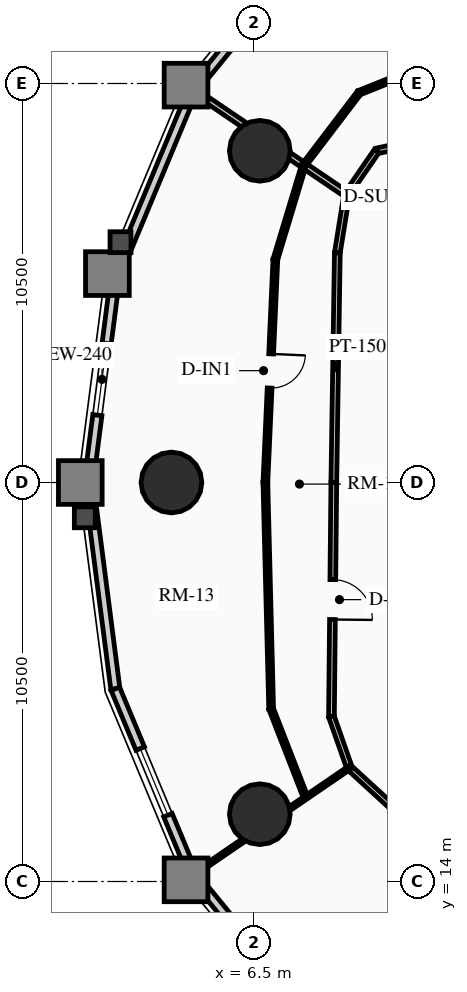
"""IFC4 building model, lengths in metres.
Left out: names, types, materials, properties, quantities, classifications, styles, units other than length and angle.
Written with IfcOpenShell. Run it as: python <this file> out.ifc"""

import sys

from ifc_helpers import new_model, si_unit, direction, frame, frame_2d, origin, origin_2d, place, context, subcontext, project, spatial, rectangle, circle, extrude, source, transform, mapped, element, fill, save


model = new_model("IFC4")
c1 = context("Model", 3, precision=1e-05, world=origin(), true_north=direction((0.0, 1.0)))
c2 = subcontext(c1, "Body", "Model", "MODEL_VIEW")
j1 = project(units=[si_unit("LENGTHUNIT", "METRE"), si_unit("PLANEANGLEUNIT", "RADIAN")], contexts=[c1])
p1 = place(None, origin())
s1 = spatial("IfcSite", under=j1, at=p1, CompositionType="ELEMENT")
p2 = place(p1, origin())
s2 = spatial("IfcBuilding", under=s1, at=p2, CompositionType="ELEMENT")
p3 = place(p2, frame((0.0, 0.0, 22.0)))
s3 = spatial("IfcBuildingStorey", under=s2, at=p3, CompositionType="ELEMENT", Elevation=22.0)
for number, where, z_axis, x_axis in (
    (1, (6.653, 33.229, 0.0), (0.0, 0.0, 1.0), (1.0, 0.0, 0.0)),
    (2, (4.328, 24.5, 0.0), (0.0, 0.0, 1.0), (1.0, 0.0, 0.0)),
    (3, (6.653, 15.771, 0.0), (0.0, 0.0, 1.0), (1.0, 0.0, 0.0)),
):
    element("IfcColumn", number, at=place(p3, frame(where, z_axis=z_axis, x_axis=x_axis)), inside=s3, PredefinedType="USERDEFINED", context=c2, shape_type="SweptSolid", body=[
        extrude(circle(Radius=0.8, at=origin_2d()), origin(), (0.0, 0.0, 1.0), 2.91),
    ])
p4 = place(p3, frame((4.89, 34.827, 0.0), z_axis=(0.0, 0.0, 1.0), x_axis=(0.632588557044, 0.774488035735, 0.0)))
e4 = element("IfcWall", 4, at=p4, inside=s3, PredefinedType="SOLIDWALL", context=c2, shape_type="SweptSolid", body=[
    extrude(rectangle(XDim=5.019, YDim=0.24, at=frame_2d((2.509, 0.0))), origin(), (0.0, 0.0, 1.0), 2.073),
])
m1 = source(origin(), c2, "Body", "SweptSolid", [
    extrude(rectangle(XDim=2.2, YDim=1.35, at=frame_2d((1.1, 0.675))), frame((0.0, 0.13, 0.0), z_axis=(0.0, -1.0, 0.0), x_axis=(1.0, 0.0, 0.0)), (0.0, 0.0, 1.0), 0.26),
])
p5 = place(p4, frame((1.409, 0.0, 0.65)))
e5 = element("IfcOpeningElement", 5, at=p5, cuts=e4, PredefinedType="OPENING", context=c2, shape_type="MappedRepresentation", body=[
    mapped(m1, transform((0.0, 0.0, 0.0), x_axis=(1.0, 0.0, 0.0), y_axis=(0.0, 1.0, 0.0), z_axis=(0.0, 0.0, 1.0), scale=1.0)),
])
p6 = place(p3, frame((2.851, 29.929, 0.0), z_axis=(0.0, 0.0, 1.0), x_axis=(0.384255919668, 0.923226618009, 0.0)))
e6 = element("IfcWall", 6, at=p6, inside=s3, PredefinedType="SOLIDWALL", context=c2, shape_type="SweptSolid", body=[
    extrude(rectangle(XDim=5.305, YDim=0.24, at=frame_2d((2.653, 0.0))), origin(), (0.0, 0.0, 1.0), 2.073),
])
p7 = place(p3, frame((2.149, 24.5, 0.0), z_axis=(0.0, 0.0, 1.0), x_axis=(0.128298189174, 0.991735637483, 0.0)))
e7 = element("IfcWall", 7, at=p7, inside=s3, PredefinedType="SOLIDWALL", context=c2, shape_type="SweptSolid", body=[
    extrude(rectangle(XDim=5.475, YDim=0.24, at=frame_2d((2.737, 0.0))), origin(), (0.0, 0.0, 1.0), 2.073),
])
m2 = source(origin(), c2, "Body", "SweptSolid", [
    extrude(rectangle(XDim=1.9, YDim=1.35, at=frame_2d((0.95, 0.675))), frame((0.0, 0.13, 0.0), z_axis=(0.0, -1.0, 0.0), x_axis=(1.0, 0.0, 0.0)), (0.0, 0.0, 1.0), 0.26),
])
p8 = place(p7, frame((1.787, 0.0, 0.65)))
e8 = element("IfcOpeningElement", 8, at=p8, cuts=e7, PredefinedType="OPENING", context=c2, shape_type="MappedRepresentation", body=[
    mapped(m2, transform((0.0, 0.0, 0.0), x_axis=(1.0, 0.0, 0.0), y_axis=(0.0, 1.0, 0.0), z_axis=(0.0, 0.0, 1.0), scale=1.0)),
])
p9 = place(p3, frame((2.851, 19.071, 0.0), z_axis=(0.0, 0.0, 1.0), x_axis=(-0.128298189174, 0.991735637483, 0.0)))
e9 = element("IfcWall", 9, at=p9, inside=s3, PredefinedType="SOLIDWALL", context=c2, shape_type="SweptSolid", body=[
    extrude(rectangle(XDim=5.475, YDim=0.24, at=frame_2d((2.737, 0.0))), origin(), (0.0, 0.0, 1.0), 2.073),
])
p10 = place(p3, frame((4.89, 14.173, 0.0), z_axis=(0.0, 0.0, 1.0), x_axis=(-0.384255919668, 0.923226618009, 0.0)))
e10 = element("IfcWall", 10, at=p10, inside=s3, PredefinedType="SOLIDWALL", context=c2, shape_type="SweptSolid", body=[
    extrude(rectangle(XDim=5.305, YDim=0.24, at=frame_2d((2.653, 0.0))), origin(), (0.0, 0.0, 1.0), 2.073),
])
p11 = place(p10, frame((1.703, 0.0, 0.65)))
e11 = element("IfcOpeningElement", 11, at=p11, cuts=e10, PredefinedType="OPENING", context=c2, shape_type="MappedRepresentation", body=[
    mapped(m2, transform((0.0, 0.0, 0.0), x_axis=(1.0, 0.0, 0.0), y_axis=(0.0, 1.0, 0.0), z_axis=(0.0, 0.0, 1.0), scale=1.0)),
])
p12 = place(p3, frame((8.065, 10.286, 0.0), z_axis=(0.0, 0.0, 1.0), x_axis=(-0.632588557044, 0.774488035735, 0.0)))
e12 = element("IfcWall", 12, at=p12, inside=s3, PredefinedType="SOLIDWALL", context=c2, shape_type="SweptSolid", body=[
    extrude(rectangle(XDim=5.019, YDim=0.24, at=frame_2d((2.509, 0.0))), origin(), (0.0, 0.0, 1.0), 2.073),
])
p13 = place(p3, frame((11.62, 33.637, 0.0), z_axis=(0.0, 0.0, 1.0), x_axis=(-0.97702579435, -0.213121085711, 0.0)))
e13 = element("IfcWall", 13, at=p13, inside=s3, PredefinedType="PARTITIONING", context=c2, shape_type="SweptSolid", body=[
    extrude(rectangle(XDim=1.935, YDim=0.15, at=frame_2d((0.967, 0.0))), origin(), (0.0, 0.0, 1.0), 2.159),
])
m3 = source(origin(), c2, "Body", "SweptSolid", [
    extrude(rectangle(XDim=1.05, YDim=2.015, at=frame_2d((0.525, 1.007))), frame((0.0, 0.085, 0.0), z_axis=(0.0, -1.0, 0.0), x_axis=(1.0, 0.0, 0.0)), (0.0, 0.0, 1.0), 0.17),
])
p14 = place(p13, frame((0.442, 0.0, 0.0)))
e14 = element("IfcOpeningElement", 14, at=p14, cuts=e13, PredefinedType="OPENING", context=c2, shape_type="MappedRepresentation", body=[
    mapped(m3, transform((0.0, 0.0, 0.0), x_axis=(1.0, 0.0, 0.0), y_axis=(0.0, 1.0, 0.0), z_axis=(0.0, 0.0, 1.0), scale=1.0)),
])
p15 = place(p3, frame((9.729, 33.225, 0.0), z_axis=(0.0, 0.0, 1.0), x_axis=(-0.567183649484, -0.82359134755, 0.0)))
e15 = element("IfcWall", 15, at=p15, inside=s3, PredefinedType="PARTITIONING", context=c2, shape_type="SweptSolid", body=[
    extrude(rectangle(XDim=1.392, YDim=0.15, at=frame_2d((0.696, 0.0))), origin(), (0.0, 0.0, 1.0), 2.159),
])
p16 = place(p3, frame((8.94, 32.078, 0.0), z_axis=(0.0, 0.0, 1.0), x_axis=(-0.159148467753, -0.98725466077, 0.0)))
e16 = element("IfcWall", 16, at=p16, inside=s3, PredefinedType="PARTITIONING", context=c2, shape_type="SweptSolid", body=[
    extrude(rectangle(XDim=1.554, YDim=0.15, at=frame_2d((0.777, 0.0))), origin(), (0.0, 0.0, 1.0), 2.205),
])
p17 = place(p3, frame((8.693, 30.544, 0.0), z_axis=(0.0, 0.0, 1.0), x_axis=(-0.015307007986, -0.99988284089, 0.0)))
e17 = element("IfcWall", 17, at=p17, inside=s3, PredefinedType="PARTITIONING", context=c2, shape_type="SweptSolid", body=[
    extrude(rectangle(XDim=6.045, YDim=0.15, at=frame_2d((3.022, 0.0))), origin(), (0.0, 0.0, 1.0), 2.635),
])
p18 = place(p3, frame((8.6, 24.5, 0.0), z_axis=(0.0, 0.0, 1.0), x_axis=(-0.010023665349, -0.999949761805, 0.0)))
e18 = element("IfcWall", 18, at=p18, inside=s3, PredefinedType="PARTITIONING", context=c2, shape_type="SweptSolid", body=[
    extrude(rectangle(XDim=6.162, YDim=0.15, at=frame_2d((3.081, 0.0))), origin(), (0.0, 0.0, 1.0), 2.159),
])
p19 = place(p18, frame((2.556, 0.0, 0.0)))
e19 = element("IfcOpeningElement", 19, at=p19, cuts=e18, PredefinedType="OPENING", context=c2, shape_type="MappedRepresentation", body=[
    mapped(m3, transform((0.0, 0.0, 0.0), x_axis=(1.0, 0.0, 0.0), y_axis=(0.0, 1.0, 0.0), z_axis=(0.0, 0.0, 1.0), scale=1.0)),
])
p20 = place(p3, frame((8.538, 18.338, 0.0), z_axis=(0.0, 0.0, 1.0), x_axis=(0.331358150167, -0.94350504838, 0.0)))
e20 = element("IfcWall", 20, at=p20, inside=s3, PredefinedType="PARTITIONING", context=c2, shape_type="SweptSolid", body=[
    extrude(rectangle(XDim=1.424, YDim=0.15, at=frame_2d((0.712, 0.0))), origin(), (0.0, 0.0, 1.0), 2.205),
])
p21 = place(p3, frame((9.01, 16.994, 0.0), z_axis=(0.0, 0.0, 1.0), x_axis=(0.737701798986, -0.67512669609, 0.0)))
e21 = element("IfcWall", 21, at=p21, inside=s3, PredefinedType="PARTITIONING", context=c2, shape_type="SweptSolid", body=[
    extrude(rectangle(XDim=1.498, YDim=0.15, at=frame_2d((0.749, 0.0))), origin(), (0.0, 0.0, 1.0), 2.159),
])
p22 = place(p3, frame((8.94, 32.078, 0.0), z_axis=(0.0, 0.0, 1.0), x_axis=(-0.827476605417, 0.561500193666, 0.0)))
e22 = element("IfcWall", 22, at=p22, inside=s3, PredefinedType="PARTITIONING", context=c2, shape_type="SweptSolid", body=[
    extrude(rectangle(XDim=4.875, YDim=0.16, at=frame_2d((2.438, 0.0))), origin(), (0.0, 0.0, 1.0), 2.073),
])
p23 = place(p3, frame((9.01, 16.994, 0.0), z_axis=(0.0, 0.0, 1.0), x_axis=(-0.825130244962, -0.564942544733, 0.0)))
e23 = element("IfcWall", 23, at=p23, inside=s3, PredefinedType="MOVABLE", context=c2, shape_type="SweptSolid", body=[
    extrude(rectangle(XDim=4.974, YDim=0.1, at=frame_2d((2.487, 0.0))), origin(), (0.0, 0.0, 1.0), 2.073),
])
p24 = place(p3, frame((11.746, 35.752, 0.0), z_axis=(0.0, 0.0, 1.0), x_axis=(-0.928091790064, -0.372351486119, 0.0)))
e24 = element("IfcWall", 24, at=p24, inside=s3, PredefinedType="PARTITIONING", context=c2, shape_type="SweptSolid", body=[
    extrude(rectangle(XDim=2.672, YDim=0.125, at=frame_2d((1.336, 0.0))), origin(), (0.0, 0.0, 1.0), 2.205),
])
m4 = source(origin(), c2, "Body", "SweptSolid", [
    extrude(rectangle(XDim=0.9, YDim=2.005, at=frame_2d((0.45, 1.002))), frame((0.0, 0.073, 0.0), z_axis=(0.0, -1.0, 0.0), x_axis=(1.0, 0.0, 0.0)), (0.0, 0.0, 1.0), 0.145),
])
p25 = place(p24, frame((0.886, 0.0, 0.0)))
e25 = element("IfcOpeningElement", 25, at=p25, cuts=e24, PredefinedType="OPENING", context=c2, shape_type="MappedRepresentation", body=[
    mapped(m4, transform((0.0, 0.0, 0.0), x_axis=(1.0, 0.0, 0.0), y_axis=(0.0, 1.0, 0.0), z_axis=(0.0, 0.0, 1.0), scale=1.0)),
])
p26 = place(p3, frame((9.267, 34.757, 0.0), z_axis=(0.0, 0.0, 1.0), x_axis=(-0.60573716219, -0.795664810295, 0.0)))
e26 = element("IfcWall", 26, at=p26, inside=s3, PredefinedType="PARTITIONING", context=c2, shape_type="SweptSolid", body=[
    extrude(rectangle(XDim=2.404, YDim=0.125, at=frame_2d((1.202, 0.0))), origin(), (0.0, 0.0, 1.0), 2.159),
])
p27 = place(p3, frame((7.811, 32.845, 0.0), z_axis=(0.0, 0.0, 1.0), x_axis=(-0.289357304294, -0.957221160679, 0.0)))
e27 = element("IfcWall", 27, at=p27, inside=s3, PredefinedType="PARTITIONING", context=c2, shape_type="SweptSolid", body=[
    extrude(rectangle(XDim=2.585, YDim=0.125, at=frame_2d((1.292, 0.0))), origin(), (0.0, 0.0, 1.0), 2.159),
])
p28 = place(p3, frame((7.062, 30.37, 0.0), z_axis=(0.0, 0.0, 1.0), x_axis=(-0.044789476409, -0.998996447843, 0.0)))
e28 = element("IfcWall", 28, at=p28, inside=s3, PredefinedType="PARTITIONING", context=c2, shape_type="SweptSolid", body=[
    extrude(rectangle(XDim=5.876, YDim=0.125, at=frame_2d((2.938, 0.0))), origin(), (0.0, 0.0, 1.0), 2.635),
])
p29 = place(p28, frame((2.488, 0.0, 0.0)))
e29 = element("IfcOpeningElement", 29, at=p29, cuts=e28, PredefinedType="OPENING", context=c2, shape_type="MappedRepresentation", body=[
    mapped(m4, transform((0.0, 0.0, 0.0), x_axis=(1.0, 0.0, 0.0), y_axis=(0.0, 1.0, 0.0), z_axis=(0.0, 0.0, 1.0), scale=1.0)),
])
p30 = place(p3, frame((6.799, 24.5, 0.0), z_axis=(0.0, 0.0, 1.0), x_axis=(0.02553283421, -0.999673984045, 0.0)))
e30 = element("IfcWall", 30, at=p30, inside=s3, PredefinedType="PARTITIONING", context=c2, shape_type="SweptSolid", body=[
    extrude(rectangle(XDim=5.957, YDim=0.125, at=frame_2d((2.979, 0.0))), origin(), (0.0, 0.0, 1.0), 2.159),
])
p31 = place(p3, frame((6.951, 18.545, 0.0), z_axis=(0.0, 0.0, 1.0), x_axis=(0.362681113276, -0.931913306093, 0.0)))
e31 = element("IfcWall", 31, at=p31, inside=s3, PredefinedType="PARTITIONING", context=c2, shape_type="SweptSolid", body=[
    extrude(rectangle(XDim=2.508, YDim=0.125, at=frame_2d((1.254, 0.0))), origin(), (0.0, 0.0, 1.0), 2.159),
])
m5 = source(origin(), c2, "Body", "SweptSolid", [
    extrude(rectangle(XDim=1.9, YDim=1.35, at=frame_2d((0.95, 0.675))), frame((0.0, 0.03, 0.0), z_axis=(0.0, -1.0, 0.0), x_axis=(1.0, 0.0, 0.0)), (0.0, 0.0, 1.0), 0.06),
])
p32 = place(p8, origin())
e32 = element("IfcWindow", 32, at=p32, inside=s3, PartitioningType="DOUBLE_PANEL_VERTICAL", PredefinedType="WINDOW", context=c2, shape_type="MappedRepresentation", body=[
    mapped(m5, transform((0.0, 0.0, 0.0), x_axis=(1.0, 0.0, 0.0), y_axis=(0.0, 1.0, 0.0), z_axis=(0.0, 0.0, 1.0), scale=1.0)),
])
fill(e8, e32)
p33 = place(p11, origin())
e33 = element("IfcWindow", 33, at=p33, inside=s3, PartitioningType="DOUBLE_PANEL_VERTICAL", PredefinedType="WINDOW", context=c2, shape_type="MappedRepresentation", body=[
    mapped(m5, transform((0.0, 0.0, 0.0), x_axis=(1.0, 0.0, 0.0), y_axis=(0.0, 1.0, 0.0), z_axis=(0.0, 0.0, 1.0), scale=1.0)),
])
fill(e11, e33)
m6 = source(origin(), c2, "Body", "SweptSolid", [
    extrude(rectangle(XDim=1.05, YDim=2.015, at=frame_2d((0.525, 1.007))), frame((0.0, 0.025, 0.0), z_axis=(0.0, -1.0, 0.0), x_axis=(1.0, 0.0, 0.0)), (0.0, 0.0, 1.0), 0.05),
])
p34 = place(p19, origin())
e34 = element("IfcDoor", 34, at=p34, inside=s3, OperationType="SINGLE_SWING_RIGHT", PredefinedType="DOOR", context=c2, shape_type="MappedRepresentation", body=[
    mapped(m6, transform((0.0, 0.0, 0.0), x_axis=(1.0, 0.0, 0.0), y_axis=(0.0, 1.0, 0.0), z_axis=(0.0, 0.0, 1.0), scale=1.0)),
])
fill(e19, e34)
m7 = source(origin(), c2, "Body", "SweptSolid", [
    extrude(rectangle(XDim=0.9, YDim=2.005, at=frame_2d((0.45, 1.002))), frame((0.0, 0.025, 0.0), z_axis=(0.0, -1.0, 0.0), x_axis=(1.0, 0.0, 0.0)), (0.0, 0.0, 1.0), 0.05),
])
p35 = place(p29, origin())
e35 = element("IfcDoor", 35, at=p35, inside=s3, OperationType="SINGLE_SWING_LEFT", PredefinedType="DOOR", context=c2, shape_type="MappedRepresentation", body=[
    mapped(m7, transform((0.0, 0.0, 0.0), x_axis=(1.0, 0.0, 0.0), y_axis=(0.0, 1.0, 0.0), z_axis=(0.0, 0.0, 1.0), scale=1.0)),
])
fill(e29, e35)
save(model, sys.argv[1])
